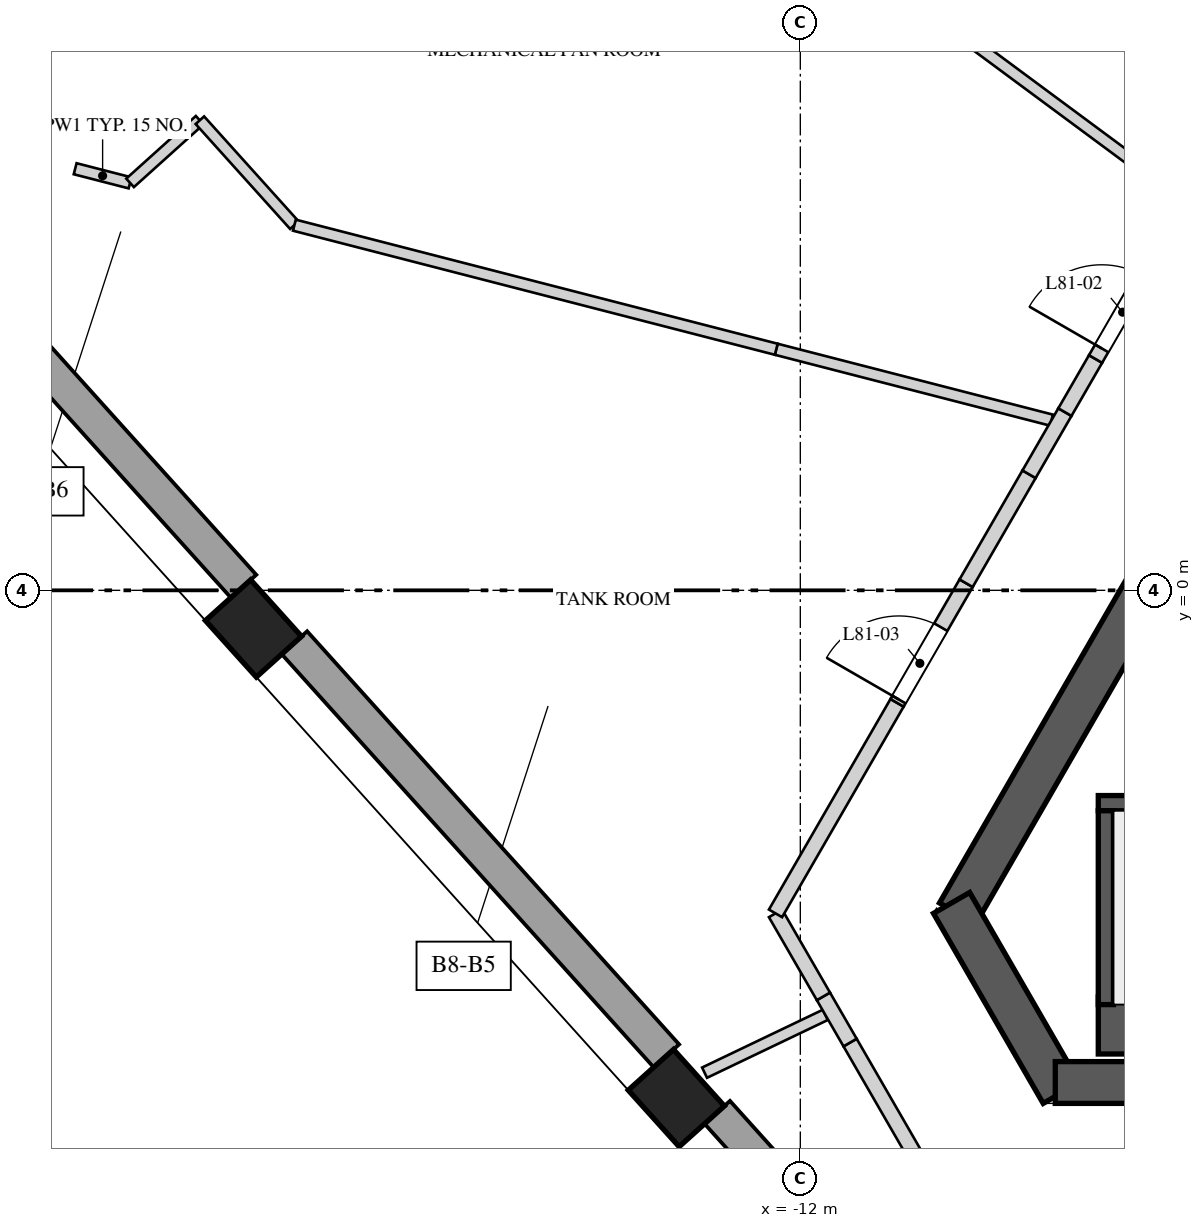
"""IFC4 building model, lengths in metres.
Left out: names, types, materials, properties, quantities, classifications, styles, units other than length and angle.
Written with IfcOpenShell. Run it as: python <this file> out.ifc"""

import sys

from ifc_helpers import new_model, si_unit, direction, frame, frame_2d, origin, origin_2d, place, context, subcontext, project, spatial, polyline, rectangle, outline, extrude, element, fill, save


model = new_model("IFC4")
c1 = context("Model", 3, precision=1e-05, world=origin(), true_north=direction((0.0, 1.0)))
c2 = subcontext(c1, "Body", "Model", "MODEL_VIEW")
j1 = project(units=[si_unit("LENGTHUNIT", "METRE"), si_unit("PLANEANGLEUNIT", "RADIAN")], contexts=[c1])
p1 = place(None, origin())
s1 = spatial("IfcSite", under=j1, at=p1, CompositionType="ELEMENT")
p2 = place(p1, origin())
s2 = spatial("IfcBuilding", under=s1, at=p2, CompositionType="ELEMENT")
p3 = place(p2, frame((0.0, 0.0, 352.4)))
s3 = spatial("IfcBuildingStorey", under=s2, at=p3, CompositionType="ELEMENT", Elevation=352.4)
p4 = place(p3, frame((-1.285, 10.725, 0.0), z_axis=(0.0, 0.0, 1.0), x_axis=(-0.499994590896, -0.86602852671, 0.0)))
e1 = element("IfcWall", 1, at=p4, inside=s3, PredefinedType="SHEAR", context=c2, shape_type="SweptSolid", body=[
    extrude(rectangle(XDim=17.292, YDim=0.55, at=frame_2d((8.646, 0.0))), origin(), (0.0, 0.0, 1.0), 4.5),
])
p5 = place(p4, frame((6.851, 0.0, 0.0)))
e2 = element("IfcOpeningElement", 2, at=p5, cuts=e1, PredefinedType="OPENING", context=c2, shape_type="SweptSolid", body=[
    extrude(rectangle(XDim=1.0, YDim=2.4, at=frame_2d((0.5, 1.2))), frame((0.0, 0.285, 0.0), z_axis=(0.0, -1.0, 0.0), x_axis=(1.0, 0.0, 0.0)), (0.0, 0.0, 1.0), 0.57),
])
p6 = place(p3, frame((-10.01, -4.113, 0.0), z_axis=(0.0, 0.0, 1.0), x_axis=(0.499995765644, -0.866027848477, 0.0)))
e3 = element("IfcWall", 3, at=p6, inside=s3, PredefinedType="SHEAR", context=c2, shape_type="SweptSolid", body=[
    extrude(rectangle(XDim=2.887, YDim=0.55, at=frame_2d((1.443, 0.0))), origin(), (0.0, 0.0, 1.0), 4.5),
])
p7 = place(p3, frame((-8.646, -6.475, 0.0), z_axis=(0.0, 0.0, 1.0), x_axis=(1.0, 0.0, 0.0)))
e4 = element("IfcWall", 4, at=p7, inside=s3, PredefinedType="SHEAR", context=c2, shape_type="SweptSolid", body=[
    extrude(rectangle(XDim=17.292, YDim=0.55, at=frame_2d((8.646, 0.0))), origin(), (0.0, 0.0, 1.0), 4.5),
])
p8 = place(p7, frame((6.851, 0.0, 0.0)))
e5 = element("IfcOpeningElement", 5, at=p8, cuts=e4, PredefinedType="OPENING", context=c2, shape_type="SweptSolid", body=[
    extrude(rectangle(XDim=1.0, YDim=2.4, at=frame_2d((0.5, 1.2))), frame((0.0, 0.285, 0.0), z_axis=(0.0, -1.0, 0.0), x_axis=(1.0, 0.0, 0.0)), (0.0, 0.0, 1.0), 0.57),
])
p9 = place(p7, frame((15.089, 0.0, 0.0)))
e6 = element("IfcOpeningElement", 6, at=p9, cuts=e4, PredefinedType="OPENING", context=c2, shape_type="SweptSolid", body=[
    extrude(rectangle(XDim=0.8, YDim=2.1, at=frame_2d((0.4, 1.05))), frame((0.0, 0.285, 0.0), z_axis=(0.0, -1.0, 0.0), x_axis=(1.0, 0.0, 0.0)), (0.0, 0.0, 1.0), 0.57),
])
for number, where, z_axis, x_axis in (
    (7, (-19.195, -0.502, 0.0), (0.0, 0.0, 1.0), (0.669, -0.743, 0.0)),
    (8, (-13.631, -6.68, 0.0), (0.0, 0.0, 1.0), (0.669, -0.743, 0.0)),
):
    element("IfcColumn", number, at=place(p3, frame(where, z_axis=z_axis, x_axis=x_axis)), inside=s3, PredefinedType="COLUMN", context=c2, shape_type="SweptSolid", body=[
        extrude(rectangle(XDim=1.0, YDim=0.8, at=origin_2d()), origin(), (0.0, 0.0, 1.0), 4.5),
    ])
p10 = place(p3, frame((-23.817, 5.043, 0.0), z_axis=(0.0, 0.0, 1.0), x_axis=(0.669137493687, -0.743138624041, 0.0)))
e9 = element("IfcWall", 9, at=p10, inside=s3, PredefinedType="SOLIDWALL", context=c2, shape_type="SweptSolid", body=[
    extrude(rectangle(XDim=6.714, YDim=0.45, at=frame_2d((3.357, 0.0))), origin(), (0.0, 0.0, 1.0), 3.8),
])
p11 = place(p3, frame((-18.656, -0.689, 0.0), z_axis=(0.0, 0.0, 1.0), x_axis=(0.669117789535, -0.743156365598, 0.0)))
e10 = element("IfcWall", 10, at=p11, inside=s3, PredefinedType="SOLIDWALL", context=c2, shape_type="SweptSolid", body=[
    extrude(rectangle(XDim=7.314, YDim=0.45, at=frame_2d((3.657, 0.0))), origin(), (0.0, 0.0, 1.0), 3.8),
])
p12 = place(p3, frame((-13.093, -6.868, 0.0), z_axis=(0.0, 0.0, 1.0), x_axis=(0.669136224502, -0.74313976684, 0.0)))
e11 = element("IfcWall", 11, at=p12, inside=s3, PredefinedType="SOLIDWALL", context=c2, shape_type="SweptSolid", body=[
    extrude(rectangle(XDim=7.314, YDim=0.45, at=frame_2d((3.657, 0.0))), origin(), (0.0, 0.0, 1.0), 3.8),
])
p13 = place(p3, frame((-8.08, -5.725, 0.0), z_axis=(0.0, 0.0, 1.0), x_axis=(1.0, 0.0, 0.0)))
e12 = element("IfcWall", 12, at=p13, inside=s3, PredefinedType="SOLIDWALL", context=c2, shape_type="SweptSolid", body=[
    extrude(rectangle(XDim=6.2, YDim=0.75, at=frame_2d((3.1, 0.0))), origin(), (0.0, 0.0, 1.0), 4.15),
])
p14 = place(p3, frame((-8.08, -2.8, 0.0), z_axis=(0.0, 0.0, 1.0), x_axis=(1.0, 0.0, 0.0)))
e13 = element("IfcWall", 13, at=p14, inside=s3, PredefinedType="SOLIDWALL", context=c2, shape_type="SweptSolid", body=[
    extrude(rectangle(XDim=6.2, YDim=0.2, at=frame_2d((3.1, 0.0))), origin(), (0.0, 0.0, 1.0), 4.15),
])
p15 = place(p3, frame((-7.98, -2.9, 0.0), z_axis=(0.0, 0.0, 1.0), x_axis=(0.0, -1.0, 0.0)))
e14 = element("IfcWall", 14, at=p15, inside=s3, PredefinedType="SOLIDWALL", context=c2, shape_type="SweptSolid", body=[
    extrude(rectangle(XDim=2.55, YDim=0.2, at=frame_2d((1.275, 0.0))), origin(), (0.0, 0.0, 1.0), 4.15),
])
p16 = place(p3, frame((-20.818, 5.361, 0.0), z_axis=(0.0, 0.0, 1.0), x_axis=(-0.968404914067, 0.24938308365, 0.0)))
e15 = element("IfcWall", 15, at=p16, inside=s3, PredefinedType="PARTITIONING", context=c2, shape_type="SweptSolid", body=[
    extrude(rectangle(XDim=0.746, YDim=0.15, at=frame_2d((0.373, 0.0))), origin(), (0.0, 0.0, 1.0), 4.15),
])
p17 = place(p3, frame((-19.902, 6.185, 0.0), z_axis=(0.0, 0.0, 1.0), x_axis=(-0.74319559291, -0.669074219111, 0.0)))
e16 = element("IfcWall", 16, at=p17, inside=s3, PredefinedType="PARTITIONING", context=c2, shape_type="SweptSolid", body=[
    extrude(rectangle(XDim=1.232, YDim=0.15, at=frame_2d((0.616, 0.0))), origin(), (0.0, 0.0, 1.0), 4.15),
])
p18 = place(p3, frame((-18.656, 4.804, 0.0), z_axis=(0.0, 0.0, 1.0), x_axis=(-0.669080876775, 0.743189599183, 0.0)))
e17 = element("IfcWall", 17, at=p18, inside=s3, PredefinedType="PARTITIONING", context=c2, shape_type="SweptSolid", body=[
    extrude(rectangle(XDim=1.858, YDim=0.15, at=frame_2d((0.929, 0.0))), origin(), (0.0, 0.0, 1.0), 4.15),
])
p19 = place(p3, frame((-11.671, -5.585, 0.0), z_axis=(0.0, 0.0, 1.0), x_axis=(-0.902028626859, -0.431676217003, 0.0)))
e18 = element("IfcWall", 18, at=p19, inside=s3, PredefinedType="PARTITIONING", context=c2, shape_type="SweptSolid", body=[
    extrude(rectangle(XDim=1.761, YDim=0.15, at=frame_2d((0.881, 0.0))), origin(), (0.0, 0.0, 1.0), 3.45),
])
p20 = place(p3, frame((-8.696, 2.239, 0.0), z_axis=(0.0, 0.0, 1.0), x_axis=(-0.968413242645, 0.249350739864, 0.0)))
e19 = element("IfcWall", 19, at=p20, inside=s3, PredefinedType="PARTITIONING", context=c2, shape_type="SweptSolid", body=[
    extrude(rectangle(XDim=3.739, YDim=0.15, at=frame_2d((1.87, 0.0))), origin(), (0.0, 0.0, 1.0), 3.05),
])
p21 = place(p3, frame((-12.317, 3.171, 0.0), z_axis=(0.0, 0.0, 1.0), x_axis=(-0.9684026585, 0.249391842309, 0.0)))
e20 = element("IfcWall", 20, at=p21, inside=s3, PredefinedType="PARTITIONING", context=c2, shape_type="SweptSolid", body=[
    extrude(rectangle(XDim=6.546, YDim=0.15, at=frame_2d((3.273, 0.0))), origin(), (0.0, 0.0, 1.0), 4.15),
])
p22 = place(p3, frame((-6.998, 5.18, 0.0), z_axis=(0.0, 0.0, 1.0), x_axis=(-0.803760198744, 0.594953395582, 0.0)))
e21 = element("IfcWall", 21, at=p22, inside=s3, PredefinedType="PARTITIONING", context=c2, shape_type="SweptSolid", body=[
    extrude(rectangle(XDim=10.117, YDim=0.15, at=frame_2d((5.059, 0.0))), origin(), (0.0, 0.0, 1.0), 3.25),
])
p23 = place(p3, frame((-9.844, -8.55, 0.0), z_axis=(0.0, 0.0, 1.0), x_axis=(-0.500003959331, 0.866023117852, 0.0)))
e22 = element("IfcWall", 22, at=p23, inside=s3, PredefinedType="SOLIDWALL", context=c2, shape_type="SweptSolid", body=[
    extrude(rectangle(XDim=3.003, YDim=0.2, at=frame_2d((1.501, 0.0))), origin(), (0.0, 0.0, 1.0), 4.15),
])
p24 = place(p3, frame((-11.345, -5.949, 0.0), z_axis=(0.0, 0.0, 1.0), x_axis=(-0.499993523031, 0.866029143232, 0.0)))
e23 = element("IfcWall", 23, at=p24, inside=s3, PredefinedType="SOLIDWALL", context=c2, shape_type="SweptSolid", body=[
    extrude(rectangle(XDim=0.702, YDim=0.2, at=frame_2d((0.351, 0.0))), origin(), (0.0, 0.0, 1.0), 3.45),
])
p25 = place(p3, frame((-11.696, -5.342, 0.0), z_axis=(0.0, 0.0, 1.0), x_axis=(-0.500013012896, 0.866017890655, 0.0)))
e24 = element("IfcWall", 24, at=p25, inside=s3, PredefinedType="SOLIDWALL", context=c2, shape_type="SweptSolid", body=[
    extrude(rectangle(XDim=1.261, YDim=0.2, at=frame_2d((0.63, 0.0))), origin(), (0.0, 0.0, 1.0), 4.15),
])
p26 = place(p3, frame((-12.326, -4.25, 0.0), z_axis=(0.0, 0.0, 1.0), x_axis=(0.499997778408, 0.866026686418, 0.0)))
e25 = element("IfcWall", 25, at=p26, inside=s3, PredefinedType="SOLIDWALL", context=c2, shape_type="SweptSolid", body=[
    extrude(rectangle(XDim=3.198, YDim=0.2, at=frame_2d((1.599, 0.0))), origin(), (0.0, 0.0, 1.0), 4.15),
])
p27 = place(p3, frame((-10.727, -1.48, 0.0), z_axis=(0.0, 0.0, 1.0), x_axis=(0.500040320227, 0.866002123639, 0.0)))
e26 = element("IfcWall", 26, at=p27, inside=s3, PredefinedType="SOLIDWALL", context=c2, shape_type="SweptSolid", body=[
    extrude(outline(polyline([(0.0, 0.0), (1.817, 0.0), (1.817, 3.45), (0.996, 3.45), (0.996, 4.15), (0.0, 4.15), (0.0, 0.0)])), frame((0.0, 0.1, 0.0), z_axis=(0.0, -1.0, 0.0), x_axis=(1.0, 0.0, 0.0)), (0.0, 0.0, 1.0), 0.2),
])
p28 = place(p27, frame((0.05, 0.0, 0.0)))
e27 = element("IfcOpeningElement", 27, at=p28, cuts=e26, PredefinedType="OPENING", context=c2, shape_type="SweptSolid", body=[
    extrude(rectangle(XDim=1.1, YDim=2.4, at=frame_2d((0.55, 1.2))), frame((0.0, 0.11, 0.0), z_axis=(0.0, -1.0, 0.0), x_axis=(1.0, 0.0, 0.0)), (0.0, 0.0, 1.0), 0.22),
])
p29 = place(p3, frame((-9.819, 0.094, 0.0), z_axis=(0.0, 0.0, 1.0), x_axis=(0.49997779057, 0.866038226025, 0.0)))
e28 = element("IfcWall", 28, at=p29, inside=s3, PredefinedType="SOLIDWALL", context=c2, shape_type="SweptSolid", body=[
    extrude(rectangle(XDim=1.655, YDim=0.2, at=frame_2d((0.828, 0.0))), origin(), (0.0, 0.0, 1.0), 4.15),
])
p30 = place(p3, frame((-8.991, 1.527, 0.0), z_axis=(0.0, 0.0, 1.0), x_axis=(0.500006071987, 0.866021898093, 0.0)))
e29 = element("IfcWall", 29, at=p30, inside=s3, PredefinedType="SOLIDWALL", context=c2, shape_type="SweptSolid", body=[
    extrude(rectangle(XDim=0.944, YDim=0.2, at=frame_2d((0.472, 0.0))), origin(), (0.0, 0.0, 1.0), 3.05),
])
p31 = place(p3, frame((-8.519, 2.344, 0.0), z_axis=(0.0, 0.0, 1.0), x_axis=(0.499914554297, 0.866074730264, 0.0)))
e30 = element("IfcWall", 30, at=p31, inside=s3, PredefinedType="SOLIDWALL", context=c2, shape_type="SweptSolid", body=[
    extrude(rectangle(XDim=0.807, YDim=0.2, at=frame_2d((0.403, 0.0))), origin(), (0.0, 0.0, 1.0), 4.15),
])
p32 = place(p3, frame((-8.116, 3.043, 0.0), z_axis=(0.0, 0.0, 1.0), x_axis=(0.500023253097, 0.866011978186, 0.0)))
e31 = element("IfcWall", 31, at=p32, inside=s3, PredefinedType="SOLIDWALL", context=c2, shape_type="SweptSolid", body=[
    extrude(outline(polyline([(0.0, 0.0), (1.312, 0.0), (1.311, 4.15), (0.906, 4.15), (0.906, 3.05), (0.0, 3.05), (0.0, 0.0)])), frame((0.0, 0.1, 0.0), z_axis=(0.0, -1.0, 0.0), x_axis=(1.0, 0.0, 0.0)), (0.0, 0.0, 1.0), 0.2),
])
p33 = place(p32, frame((0.161, 0.0, 0.0)))
e32 = element("IfcOpeningElement", 32, at=p33, cuts=e31, PredefinedType="OPENING", context=c2, shape_type="SweptSolid", body=[
    extrude(rectangle(XDim=1.1, YDim=2.4, at=frame_2d((0.55, 1.2))), frame((0.0, 0.11, 0.0), z_axis=(0.0, -1.0, 0.0), x_axis=(1.0, 0.0, 0.0)), (0.0, 0.0, 1.0), 0.22),
])
p34 = place(p33, origin())
e33 = element("IfcDoor", 33, at=p34, inside=s3, OperationType="SINGLE_SWING_RIGHT", PredefinedType="DOOR", context=c2, shape_type="SweptSolid", body=[
    extrude(rectangle(XDim=1.1, YDim=2.4, at=frame_2d((0.55, 1.2))), frame((0.0, 0.025, 0.0), z_axis=(0.0, -1.0, 0.0), x_axis=(1.0, 0.0, 0.0)), (0.0, 0.0, 1.0), 0.05),
])
fill(e32, e33)
p35 = place(p28, origin())
e34 = element("IfcDoor", 34, at=p35, inside=s3, OperationType="SINGLE_SWING_LEFT", PredefinedType="DOOR", context=c2, shape_type="SweptSolid", body=[
    extrude(rectangle(XDim=1.1, YDim=2.4, at=frame_2d((0.55, 1.2))), frame((0.0, 0.025, 0.0), z_axis=(0.0, -1.0, 0.0), x_axis=(1.0, 0.0, 0.0)), (0.0, 0.0, 1.0), 0.05),
])
fill(e27, e34)
save(model, sys.argv[1])
